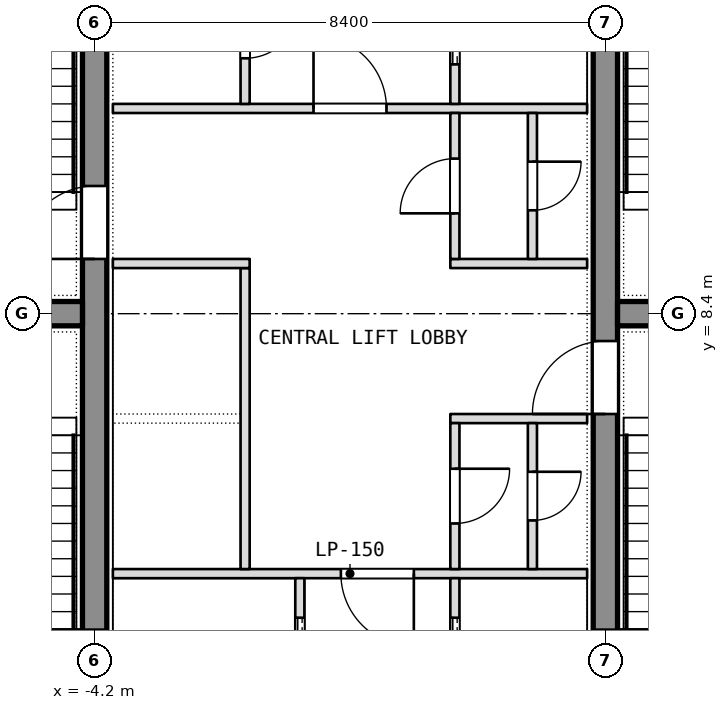
"""IFC4 building model, lengths in metres.
Left out: names, types, materials, properties, quantities, classifications, styles, units other than length and angle.
Written with IfcOpenShell. Run it as: python <this file> out.ifc"""

import sys

from ifc_helpers import new_model, si_unit, direction, frame, frame_2d, origin, place, context, subcontext, project, spatial, rectangle, extrude, element, fill, save


model = new_model("IFC4")
c1 = context("Model", 3, precision=1e-05, world=origin(), true_north=direction((0.0, 1.0)))
c2 = subcontext(c1, "Body", "Model", "MODEL_VIEW")
j1 = project(units=[si_unit("LENGTHUNIT", "METRE"), si_unit("PLANEANGLEUNIT", "RADIAN")], contexts=[c1])
p1 = place(None, origin())
s1 = spatial("IfcSite", under=j1, at=p1, CompositionType="ELEMENT")
p2 = place(p1, origin())
s2 = spatial("IfcBuilding", under=s1, at=p2, CompositionType="ELEMENT")
p3 = place(p2, frame((0.0, 0.0, 234.5)))
s3 = spatial("IfcBuildingStorey", under=s2, at=p3, CompositionType="ELEMENT", Elevation=234.5)
p4 = place(p3, frame((-4.2, 0.8, 0.0), z_axis=(0.0, 0.0, 1.0), x_axis=(0.0, 1.0, 0.0)))
e1 = element("IfcWall", 1, at=p4, inside=s3, PredefinedType="SHEAR", context=c2, shape_type="SweptSolid", body=[
    extrude(rectangle(XDim=15.2, YDim=0.4, at=frame_2d((7.6, 0.0))), origin(), (0.0, 0.0, 1.0), 3.6),
])
p5 = place(p4, frame((8.5, 0.0, 0.0)))
e2 = element("IfcOpeningElement", 2, at=p5, cuts=e1, PredefinedType="OPENING", context=c2, shape_type="SweptSolid", body=[
    extrude(rectangle(XDim=1.2, YDim=2.1, at=frame_2d((0.6, 1.05))), frame((0.0, 0.2, 0.0), z_axis=(0.0, -1.0, 0.0), x_axis=(1.0, 0.0, 0.0)), (0.0, 0.0, 1.0), 0.4),
])
p6 = place(p3, frame((4.2, 0.8, 0.0), z_axis=(0.0, 0.0, 1.0), x_axis=(0.0, 1.0, 0.0)))
e3 = element("IfcWall", 3, at=p6, inside=s3, PredefinedType="SHEAR", context=c2, shape_type="SweptSolid", body=[
    extrude(rectangle(XDim=15.2, YDim=0.4, at=frame_2d((7.6, 0.0))), origin(), (0.0, 0.0, 1.0), 3.6),
])
p7 = place(p6, frame((5.95, 0.0, 0.0)))
e4 = element("IfcOpeningElement", 4, at=p7, cuts=e3, PredefinedType="OPENING", context=c2, shape_type="SweptSolid", body=[
    extrude(rectangle(XDim=1.2, YDim=2.1, at=frame_2d((0.6, 1.05))), frame((0.0, 0.2, 0.0), z_axis=(0.0, -1.0, 0.0), x_axis=(1.0, 0.0, 0.0)), (0.0, 0.0, 1.0), 0.4),
])
for number, where, z_axis, x_axis in (
    (5, (-11.1, 8.4, 0.0), (0.0, 0.0, 1.0), (1.0, 0.0, 0.0)),
    (6, (4.4, 8.4, 0.0), (0.0, 0.0, 1.0), (1.0, 0.0, 0.0)),
):
    element("IfcWall", number, at=place(p3, frame(where, z_axis=z_axis, x_axis=x_axis)), inside=s3, PredefinedType="SHEAR", context=c2, shape_type="SweptSolid", body=[
        extrude(rectangle(XDim=6.7, YDim=0.4, at=frame_2d((3.35, 0.0))), origin(), (0.0, 0.0, 1.0), 3.6),
    ])
p8 = place(p3, frame((-3.9, 4.125, 0.0), z_axis=(0.0, 0.0, 1.0), x_axis=(1.0, 0.0, 0.0)))
e7 = element("IfcWall", 7, at=p8, inside=s3, PredefinedType="PARTITIONING", context=c2, shape_type="SweptSolid", body=[
    extrude(rectangle(XDim=7.8, YDim=0.15, at=frame_2d((3.9, 0.0))), origin(), (0.0, 0.0, 1.0), 3.34),
])
p9 = place(p8, frame((3.75, 0.0, 0.0)))
e8 = element("IfcOpeningElement", 8, at=p9, cuts=e7, PredefinedType="OPENING", context=c2, shape_type="SweptSolid", body=[
    extrude(rectangle(XDim=1.2, YDim=2.1, at=frame_2d((0.6, 1.05))), frame((0.0, 0.075, 0.0), z_axis=(0.0, -1.0, 0.0), x_axis=(1.0, 0.0, 0.0)), (0.0, 0.0, 1.0), 0.15),
])
p10 = place(p3, frame((-3.9, 11.775, 0.0), z_axis=(0.0, 0.0, 1.0), x_axis=(1.0, 0.0, 0.0)))
e9 = element("IfcWall", 9, at=p10, inside=s3, PredefinedType="PARTITIONING", context=c2, shape_type="SweptSolid", body=[
    extrude(rectangle(XDim=7.8, YDim=0.15, at=frame_2d((3.9, 0.0))), origin(), (0.0, 0.0, 1.0), 3.34),
])
p11 = place(p10, frame((3.3, 0.0, 0.0)))
e10 = element("IfcOpeningElement", 10, at=p11, cuts=e9, PredefinedType="OPENING", context=c2, shape_type="SweptSolid", body=[
    extrude(rectangle(XDim=1.2, YDim=2.1, at=frame_2d((0.6, 1.05))), frame((0.0, 0.075, 0.0), z_axis=(0.0, -1.0, 0.0), x_axis=(1.0, 0.0, 0.0)), (0.0, 0.0, 1.0), 0.15),
])
p12 = place(p3, frame((-0.825, 1.5, 0.0), z_axis=(0.0, 0.0, 1.0), x_axis=(0.0, 1.0, 0.0)))
e11 = element("IfcWall", 11, at=p12, inside=s3, PredefinedType="SHEAR", context=c2, shape_type="SweptSolid", body=[
    extrude(rectangle(XDim=2.55, YDim=0.15, at=frame_2d((1.275, 0.0))), origin(), (0.0, 0.0, 1.0), 3.6),
])
p13 = place(p12, frame((0.8, 0.0, 0.0)))
e12 = element("IfcOpeningElement", 12, at=p13, cuts=e11, PredefinedType="OPENING", context=c2, shape_type="SweptSolid", body=[
    extrude(rectangle(XDim=1.1, YDim=2.1, at=frame_2d((0.55, 1.05))), frame((0.0, 0.075, 0.0), z_axis=(0.0, -1.0, 0.0), x_axis=(1.0, 0.0, 0.0)), (0.0, 0.0, 1.0), 0.15),
])
p14 = place(p3, frame((-1.725, 4.2, 0.0), z_axis=(0.0, 0.0, 1.0), x_axis=(0.0, 1.0, 0.0)))
e13 = element("IfcWall", 13, at=p14, inside=s3, PredefinedType="SHEAR", context=c2, shape_type="SweptSolid", body=[
    extrude(rectangle(XDim=4.95, YDim=0.15, at=frame_2d((2.475, 0.0))), origin(), (0.0, 0.0, 1.0), 3.6),
])
p15 = place(p3, frame((-3.9, 9.225, 0.0), z_axis=(0.0, 0.0, 1.0), x_axis=(1.0, 0.0, 0.0)))
e14 = element("IfcWall", 14, at=p15, inside=s3, PredefinedType="SHEAR", context=c2, shape_type="SweptSolid", body=[
    extrude(rectangle(XDim=2.25, YDim=0.15, at=frame_2d((1.125, 0.0))), origin(), (0.0, 0.0, 1.0), 3.6),
])
p16 = place(p3, frame((-1.725, 11.85, 0.0), z_axis=(0.0, 0.0, 1.0), x_axis=(0.0, 1.0, 0.0)))
e15 = element("IfcWall", 15, at=p16, inside=s3, PredefinedType="PARTITIONING", context=c2, shape_type="SweptSolid", body=[
    extrude(rectangle(XDim=2.4, YDim=0.15, at=frame_2d((1.2, 0.0))), origin(), (0.0, 0.0, 1.0), 3.34),
])
p17 = place(p16, frame((0.75, 0.0, 0.0)))
e16 = element("IfcOpeningElement", 16, at=p17, cuts=e15, PredefinedType="OPENING", context=c2, shape_type="SweptSolid", body=[
    extrude(rectangle(XDim=0.9, YDim=2.1, at=frame_2d((0.45, 1.05))), frame((0.0, 0.075, 0.0), z_axis=(0.0, -1.0, 0.0), x_axis=(1.0, 0.0, 0.0)), (0.0, 0.0, 1.0), 0.15),
])
p18 = place(p3, frame((1.725, 1.65, 0.0), z_axis=(0.0, 0.0, 1.0), x_axis=(0.0, 1.0, 0.0)))
e17 = element("IfcWall", 17, at=p18, inside=s3, PredefinedType="SHEAR", context=c2, shape_type="SweptSolid", body=[
    extrude(rectangle(XDim=2.4, YDim=0.15, at=frame_2d((1.2, 0.0))), origin(), (0.0, 0.0, 1.0), 3.6),
])
p19 = place(p18, frame((0.65, 0.0, 0.0)))
e18 = element("IfcOpeningElement", 18, at=p19, cuts=e17, PredefinedType="OPENING", context=c2, shape_type="SweptSolid", body=[
    extrude(rectangle(XDim=1.1, YDim=2.1, at=frame_2d((0.55, 1.05))), frame((0.0, 0.075, 0.0), z_axis=(0.0, -1.0, 0.0), x_axis=(1.0, 0.0, 0.0)), (0.0, 0.0, 1.0), 0.15),
])
p20 = place(p3, frame((1.725, 11.85, 0.0), z_axis=(0.0, 0.0, 1.0), x_axis=(0.0, 1.0, 0.0)))
e19 = element("IfcWall", 19, at=p20, inside=s3, PredefinedType="SHEAR", context=c2, shape_type="SweptSolid", body=[
    extrude(rectangle(XDim=2.4, YDim=0.15, at=frame_2d((1.2, 0.0))), origin(), (0.0, 0.0, 1.0), 3.6),
])
p21 = place(p20, frame((0.65, 0.0, 0.0)))
e20 = element("IfcOpeningElement", 20, at=p21, cuts=e19, PredefinedType="OPENING", context=c2, shape_type="SweptSolid", body=[
    extrude(rectangle(XDim=1.1, YDim=2.1, at=frame_2d((0.55, 1.05))), frame((0.0, 0.075, 0.0), z_axis=(0.0, -1.0, 0.0), x_axis=(1.0, 0.0, 0.0)), (0.0, 0.0, 1.0), 0.15),
])
for number, where, z_axis, x_axis in (
    (21, (1.65, 6.675, 0.0), (0.0, 0.0, 1.0), (1.0, 0.0, 0.0)),
    (22, (1.65, 9.225, 0.0), (0.0, 0.0, 1.0), (1.0, 0.0, 0.0)),
):
    element("IfcWall", number, at=place(p3, frame(where, z_axis=z_axis, x_axis=x_axis)), inside=s3, PredefinedType="PARTITIONING", context=c2, shape_type="SweptSolid", body=[
        extrude(rectangle(XDim=2.25, YDim=0.15, at=frame_2d((1.125, 0.0))), origin(), (0.0, 0.0, 1.0), 3.34),
    ])
p22 = place(p3, frame((1.725, 4.2, 0.0), z_axis=(0.0, 0.0, 1.0), x_axis=(0.0, 1.0, 0.0)))
e23 = element("IfcWall", 23, at=p22, inside=s3, PredefinedType="PARTITIONING", context=c2, shape_type="SweptSolid", body=[
    extrude(rectangle(XDim=2.4, YDim=0.15, at=frame_2d((1.2, 0.0))), origin(), (0.0, 0.0, 1.0), 3.34),
])
p23 = place(p22, frame((0.75, 0.0, 0.0)))
e24 = element("IfcOpeningElement", 24, at=p23, cuts=e23, PredefinedType="OPENING", context=c2, shape_type="SweptSolid", body=[
    extrude(rectangle(XDim=0.9, YDim=2.1, at=frame_2d((0.45, 1.05))), frame((0.0, 0.075, 0.0), z_axis=(0.0, -1.0, 0.0), x_axis=(1.0, 0.0, 0.0)), (0.0, 0.0, 1.0), 0.15),
])
p24 = place(p3, frame((1.725, 9.3, 0.0), z_axis=(0.0, 0.0, 1.0), x_axis=(0.0, 1.0, 0.0)))
e25 = element("IfcWall", 25, at=p24, inside=s3, PredefinedType="PARTITIONING", context=c2, shape_type="SweptSolid", body=[
    extrude(rectangle(XDim=2.4, YDim=0.15, at=frame_2d((1.2, 0.0))), origin(), (0.0, 0.0, 1.0), 3.34),
])
p25 = place(p24, frame((0.75, 0.0, 0.0)))
e26 = element("IfcOpeningElement", 26, at=p25, cuts=e25, PredefinedType="OPENING", context=c2, shape_type="SweptSolid", body=[
    extrude(rectangle(XDim=0.9, YDim=2.1, at=frame_2d((0.45, 1.05))), frame((0.0, 0.075, 0.0), z_axis=(0.0, -1.0, 0.0), x_axis=(1.0, 0.0, 0.0)), (0.0, 0.0, 1.0), 0.15),
])
p26 = place(p3, frame((3.0, 4.2, 0.0), z_axis=(0.0, 0.0, 1.0), x_axis=(0.0, 1.0, 0.0)))
e27 = element("IfcWall", 27, at=p26, inside=s3, PredefinedType="PARTITIONING", context=c2, shape_type="SweptSolid", body=[
    extrude(rectangle(XDim=2.4, YDim=0.15, at=frame_2d((1.2, 0.0))), origin(), (0.0, 0.0, 1.0), 3.34),
])
p27 = place(p26, frame((0.8, 0.0, 0.0)))
e28 = element("IfcOpeningElement", 28, at=p27, cuts=e27, PredefinedType="OPENING", context=c2, shape_type="SweptSolid", body=[
    extrude(rectangle(XDim=0.8, YDim=2.1, at=frame_2d((0.4, 1.05))), frame((0.0, 0.075, 0.0), z_axis=(0.0, -1.0, 0.0), x_axis=(1.0, 0.0, 0.0)), (0.0, 0.0, 1.0), 0.15),
])
p28 = place(p3, frame((3.0, 9.3, 0.0), z_axis=(0.0, 0.0, 1.0), x_axis=(0.0, 1.0, 0.0)))
e29 = element("IfcWall", 29, at=p28, inside=s3, PredefinedType="PARTITIONING", context=c2, shape_type="SweptSolid", body=[
    extrude(rectangle(XDim=2.4, YDim=0.15, at=frame_2d((1.2, 0.0))), origin(), (0.0, 0.0, 1.0), 3.34),
])
p29 = place(p28, frame((0.8, 0.0, 0.0)))
e30 = element("IfcOpeningElement", 30, at=p29, cuts=e29, PredefinedType="OPENING", context=c2, shape_type="SweptSolid", body=[
    extrude(rectangle(XDim=0.8, YDim=2.1, at=frame_2d((0.4, 1.05))), frame((0.0, 0.075, 0.0), z_axis=(0.0, -1.0, 0.0), x_axis=(1.0, 0.0, 0.0)), (0.0, 0.0, 1.0), 0.15),
])
p30 = place(p23, origin())
e31 = element("IfcDoor", 31, at=p30, inside=s3, OperationType="SINGLE_SWING_LEFT", PredefinedType="DOOR", context=c2, shape_type="SweptSolid", body=[
    extrude(rectangle(XDim=0.9, YDim=2.1, at=frame_2d((0.45, 1.05))), frame((0.0, 0.025, 0.0), z_axis=(0.0, -1.0, 0.0), x_axis=(1.0, 0.0, 0.0)), (0.0, 0.0, 1.0), 0.05),
])
fill(e24, e31)
p31 = place(p27, origin())
e32 = element("IfcDoor", 32, at=p31, inside=s3, OperationType="SINGLE_SWING_LEFT", PredefinedType="DOOR", context=c2, shape_type="SweptSolid", body=[
    extrude(rectangle(XDim=0.8, YDim=2.1, at=frame_2d((0.4, 1.05))), frame((0.0, 0.025, 0.0), z_axis=(0.0, -1.0, 0.0), x_axis=(1.0, 0.0, 0.0)), (0.0, 0.0, 1.0), 0.05),
])
fill(e28, e32)
p32 = place(p25, origin())
e33 = element("IfcDoor", 33, at=p32, inside=s3, OperationType="SINGLE_SWING_LEFT", PredefinedType="DOOR", context=c2, shape_type="SweptSolid", body=[
    extrude(rectangle(XDim=0.9, YDim=2.1, at=frame_2d((0.45, 1.05))), frame((0.0, 0.025, 0.0), z_axis=(0.0, -1.0, 0.0), x_axis=(1.0, 0.0, 0.0)), (0.0, 0.0, 1.0), 0.05),
])
fill(e26, e33)
p33 = place(p29, origin())
e34 = element("IfcDoor", 34, at=p33, inside=s3, OperationType="SINGLE_SWING_LEFT", PredefinedType="DOOR", context=c2, shape_type="SweptSolid", body=[
    extrude(rectangle(XDim=0.8, YDim=2.1, at=frame_2d((0.4, 1.05))), frame((0.0, 0.025, 0.0), z_axis=(0.0, -1.0, 0.0), x_axis=(1.0, 0.0, 0.0)), (0.0, 0.0, 1.0), 0.05),
])
fill(e30, e34)
p34 = place(p13, origin())
e35 = element("IfcDoor", 35, at=p34, inside=s3, OperationType="SLIDING_TO_LEFT", PredefinedType="DOOR", context=c2, shape_type="SweptSolid", body=[
    extrude(rectangle(XDim=1.1, YDim=2.1, at=frame_2d((0.55, 1.05))), frame((0.0, 0.025, 0.0), z_axis=(0.0, -1.0, 0.0), x_axis=(1.0, 0.0, 0.0)), (0.0, 0.0, 1.0), 0.05),
])
fill(e12, e35)
p35 = place(p19, origin())
e36 = element("IfcDoor", 36, at=p35, inside=s3, OperationType="SLIDING_TO_LEFT", PredefinedType="DOOR", context=c2, shape_type="SweptSolid", body=[
    extrude(rectangle(XDim=1.1, YDim=2.1, at=frame_2d((0.55, 1.05))), frame((0.0, 0.025, 0.0), z_axis=(0.0, -1.0, 0.0), x_axis=(1.0, 0.0, 0.0)), (0.0, 0.0, 1.0), 0.05),
])
fill(e18, e36)
p36 = place(p21, origin())
e37 = element("IfcDoor", 37, at=p36, inside=s3, OperationType="SLIDING_TO_LEFT", PredefinedType="DOOR", context=c2, shape_type="SweptSolid", body=[
    extrude(rectangle(XDim=1.1, YDim=2.1, at=frame_2d((0.55, 1.05))), frame((0.0, 0.025, 0.0), z_axis=(0.0, -1.0, 0.0), x_axis=(1.0, 0.0, 0.0)), (0.0, 0.0, 1.0), 0.05),
])
fill(e20, e37)
p37 = place(p9, origin())
e38 = element("IfcDoor", 38, at=p37, inside=s3, OperationType="SINGLE_SWING_LEFT", PredefinedType="DOOR", context=c2, shape_type="SweptSolid", body=[
    extrude(rectangle(XDim=1.2, YDim=2.1, at=frame_2d((0.6, 1.05))), frame((0.0, 0.025, 0.0), z_axis=(0.0, -1.0, 0.0), x_axis=(1.0, 0.0, 0.0)), (0.0, 0.0, 1.0), 0.05),
])
fill(e8, e38)
p38 = place(p11, origin())
e39 = element("IfcDoor", 39, at=p38, inside=s3, OperationType="SINGLE_SWING_LEFT", PredefinedType="DOOR", context=c2, shape_type="SweptSolid", body=[
    extrude(rectangle(XDim=1.2, YDim=2.1, at=frame_2d((0.6, 1.05))), frame((0.0, 0.025, 0.0), z_axis=(0.0, -1.0, 0.0), x_axis=(1.0, 0.0, 0.0)), (0.0, 0.0, 1.0), 0.05),
])
fill(e10, e39)
p39 = place(p17, origin())
e40 = element("IfcDoor", 40, at=p39, inside=s3, OperationType="SINGLE_SWING_LEFT", PredefinedType="DOOR", context=c2, shape_type="SweptSolid", body=[
    extrude(rectangle(XDim=0.9, YDim=2.1, at=frame_2d((0.45, 1.05))), frame((0.0, 0.025, 0.0), z_axis=(0.0, -1.0, 0.0), x_axis=(1.0, 0.0, 0.0)), (0.0, 0.0, 1.0), 0.05),
])
fill(e16, e40)
p40 = place(p5, origin())
e41 = element("IfcDoor", 41, at=p40, inside=s3, OperationType="SINGLE_SWING_LEFT", PredefinedType="DOOR", context=c2, shape_type="SweptSolid", body=[
    extrude(rectangle(XDim=1.2, YDim=2.1, at=frame_2d((0.6, 1.05))), frame((0.0, 0.025, 0.0), z_axis=(0.0, -1.0, 0.0), x_axis=(1.0, 0.0, 0.0)), (0.0, 0.0, 1.0), 0.05),
])
fill(e2, e41)
p41 = place(p7, origin())
e42 = element("IfcDoor", 42, at=p41, inside=s3, OperationType="SINGLE_SWING_LEFT", PredefinedType="DOOR", context=c2, shape_type="SweptSolid", body=[
    extrude(rectangle(XDim=1.2, YDim=2.1, at=frame_2d((0.6, 1.05))), frame((0.0, 0.025, 0.0), z_axis=(0.0, -1.0, 0.0), x_axis=(1.0, 0.0, 0.0)), (0.0, 0.0, 1.0), 0.05),
])
fill(e4, e42)
save(model, sys.argv[1])
